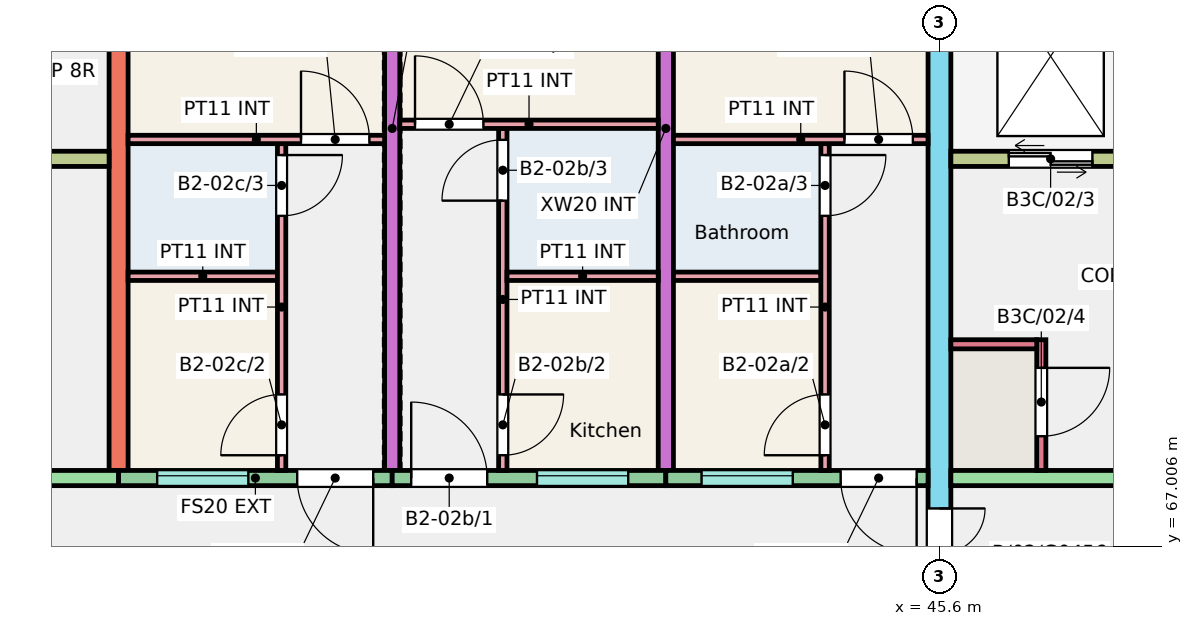
"""IFC4 building model, lengths in metres.
Left out: names, types, materials, properties, quantities, classifications, styles, units other than length and angle.
Written with IfcOpenShell. Run it as: python <this file> out.ifc"""

import sys

from ifc_helpers import new_model, si_unit, direction, frame, frame_2d, origin, place, context, subcontext, project, spatial, rectangle, extrude, element, fill, save


model = new_model("IFC4")
c1 = context("Model", 3, precision=1e-05, world=origin(), true_north=direction((0.0, 1.0)))
c2 = subcontext(c1, "Body", "Model", "MODEL_VIEW")
j1 = project(units=[si_unit("LENGTHUNIT", "METRE"), si_unit("PLANEANGLEUNIT", "RADIAN")], contexts=[c1])
p1 = place(None, origin())
s1 = spatial("IfcSite", under=j1, at=p1, CompositionType="ELEMENT")
p2 = place(p1, origin())
s2 = spatial("IfcBuilding", under=s1, at=p2, CompositionType="ELEMENT")
p3 = place(p2, frame((0.0, 0.0, 6.0)))
s3 = spatial("IfcBuildingStorey", under=s2, at=p3, CompositionType="ELEMENT", Elevation=6.0)
p4 = place(p3, frame((34.8, 68.0, 0.0), z_axis=(0.0, 0.0, 1.0), x_axis=(0.0, 1.0, 0.0)))
e1 = element("IfcWall", 1, at=p4, inside=s3, PredefinedType="SHEAR", context=c2, shape_type="SweptSolid", body=[
    extrude(rectangle(XDim=9.0, YDim=0.25, at=frame_2d((4.5, 0.0))), origin(), (0.0, 0.0, 1.0), 3.0),
])
for number, where, z_axis, x_axis in (
    (2, (38.4, 68.0, 0.0), (0.0, 0.0, 1.0), (0.0, 1.0, 0.0)),
    (3, (42.0, 68.0, 0.0), (0.0, 0.0, 1.0), (0.0, 1.0, 0.0)),
):
    element("IfcWall", number, at=place(p3, frame(where, z_axis=z_axis, x_axis=x_axis)), inside=s3, PredefinedType="SHEAR", context=c2, shape_type="SweptSolid", body=[
        extrude(rectangle(XDim=9.0, YDim=0.2, at=frame_2d((4.5, 0.0))), origin(), (0.0, 0.0, 1.0), 3.0),
    ])
p5 = place(p3, frame((45.6, 66.0, 0.0), z_axis=(0.0, 0.0, 1.0), x_axis=(0.0, 1.0, 0.0)))
e4 = element("IfcWall", 4, at=p5, inside=s3, PredefinedType="SHEAR", context=c2, shape_type="SweptSolid", body=[
    extrude(rectangle(XDim=11.0, YDim=0.3, at=frame_2d((5.5, 0.0))), origin(), (0.0, 0.0, 1.0), 3.0),
])
p6 = place(p5, frame((0.3, 0.0, 0.0)))
e5 = element("IfcOpeningElement", 5, at=p6, cuts=e4, PredefinedType="OPENING", context=c2, shape_type="SweptSolid", body=[
    extrude(rectangle(XDim=1.2, YDim=2.1, at=frame_2d((0.6, 1.05))), frame((0.0, 0.16, 0.0), z_axis=(0.0, -1.0, 0.0), x_axis=(1.0, 0.0, 0.0)), (0.0, 0.0, 1.0), 0.32),
])
p7 = place(p3, frame((28.95, 67.9, 0.0), z_axis=(0.0, 0.0, 1.0), x_axis=(1.0, 0.0, 0.0)))
e6 = element("IfcWall", 6, at=p7, inside=s3, PredefinedType="SHEAR", context=c2, shape_type="SweptSolid", body=[
    extrude(rectangle(XDim=5.85, YDim=0.2, at=frame_2d((2.925, 0.0))), origin(), (0.0, 0.0, 1.0), 3.0),
])
p8 = place(p7, frame((2.312, 0.0, 0.0)))
e7 = element("IfcOpeningElement", 7, at=p8, cuts=e6, PredefinedType="OPENING", context=c2, shape_type="SweptSolid", body=[
    extrude(rectangle(XDim=1.1, YDim=2.1, at=frame_2d((0.55, 1.05))), frame((0.0, 0.11, 0.0), z_axis=(0.0, -1.0, 0.0), x_axis=(1.0, 0.0, 0.0)), (0.0, 0.0, 1.0), 0.22),
])
p9 = place(p3, frame((28.95, 72.1, 0.0), z_axis=(0.0, 0.0, 1.0), x_axis=(1.0, 0.0, 0.0)))
e8 = element("IfcWall", 8, at=p9, inside=s3, PredefinedType="SHEAR", context=c2, shape_type="SweptSolid", body=[
    extrude(rectangle(XDim=5.725, YDim=0.2, at=frame_2d((2.863, 0.0))), origin(), (0.0, 0.0, 1.0), 3.0),
])
p10 = place(p9, frame((3.775, 0.0, 0.0)))
e9 = element("IfcOpeningElement", 9, at=p10, cuts=e8, PredefinedType="OPENING", context=c2, shape_type="SweptSolid", body=[
    extrude(rectangle(XDim=1.0, YDim=2.1, at=frame_2d((0.5, 1.05))), frame((0.0, 0.11, 0.0), z_axis=(0.0, -1.0, 0.0), x_axis=(1.0, 0.0, 0.0)), (0.0, 0.0, 1.0), 0.22),
])
p11 = place(p9, frame((0.762, 0.0, 0.0)))
e10 = element("IfcOpeningElement", 10, at=p11, cuts=e8, PredefinedType="OPENING", context=c2, shape_type="SweptSolid", body=[
    extrude(rectangle(XDim=1.1, YDim=2.1, at=frame_2d((0.55, 1.05))), frame((0.0, 0.11, 0.0), z_axis=(0.0, -1.0, 0.0), x_axis=(1.0, 0.0, 0.0)), (0.0, 0.0, 1.0), 0.22),
])
p12 = place(p3, frame((34.8, 67.9, 0.0), z_axis=(0.0, 0.0, 1.0), x_axis=(1.0, 0.0, 0.0)))
e11 = element("IfcWall", 11, at=p12, inside=s3, PredefinedType="SOLIDWALL", context=c2, shape_type="SweptSolid", body=[
    extrude(rectangle(XDim=3.6, YDim=0.2, at=frame_2d((1.8, 0.0))), origin(), (0.0, 0.0, 1.0), 3.0),
])
p13 = place(p12, frame((0.508, 0.0, 1.1)))
e12 = element("IfcOpeningElement", 12, at=p13, cuts=e11, PredefinedType="OPENING", context=c2, shape_type="SweptSolid", body=[
    extrude(rectangle(XDim=1.2, YDim=1.3, at=frame_2d((0.6, 0.65))), frame((0.0, 0.11, 0.0), z_axis=(0.0, -1.0, 0.0), x_axis=(1.0, 0.0, 0.0)), (0.0, 0.0, 1.0), 0.22),
])
p14 = place(p12, frame((2.35, 0.0, 0.0)))
e13 = element("IfcOpeningElement", 13, at=p14, cuts=e11, PredefinedType="OPENING", context=c2, shape_type="SweptSolid", body=[
    extrude(rectangle(XDim=1.0, YDim=2.1, at=frame_2d((0.5, 1.05))), frame((0.0, 0.11, 0.0), z_axis=(0.0, -1.0, 0.0), x_axis=(1.0, 0.0, 0.0)), (0.0, 0.0, 1.0), 0.22),
])
p15 = place(p3, frame((38.4, 67.9, 0.0), z_axis=(0.0, 0.0, 1.0), x_axis=(1.0, 0.0, 0.0)))
e14 = element("IfcWall", 14, at=p15, inside=s3, PredefinedType="SOLIDWALL", context=c2, shape_type="SweptSolid", body=[
    extrude(rectangle(XDim=3.6, YDim=0.2, at=frame_2d((1.8, 0.0))), origin(), (0.0, 0.0, 1.0), 3.0),
])
p16 = place(p15, frame((1.905, 0.0, 1.1)))
e15 = element("IfcOpeningElement", 15, at=p16, cuts=e14, PredefinedType="OPENING", context=c2, shape_type="SweptSolid", body=[
    extrude(rectangle(XDim=1.2, YDim=1.3, at=frame_2d((0.6, 0.65))), frame((0.0, 0.11, 0.0), z_axis=(0.0, -1.0, 0.0), x_axis=(1.0, 0.0, 0.0)), (0.0, 0.0, 1.0), 0.22),
])
p17 = place(p15, frame((0.25, 0.0, 0.0)))
e16 = element("IfcOpeningElement", 16, at=p17, cuts=e14, PredefinedType="OPENING", context=c2, shape_type="SweptSolid", body=[
    extrude(rectangle(XDim=1.0, YDim=2.1, at=frame_2d((0.5, 1.05))), frame((0.0, 0.11, 0.0), z_axis=(0.0, -1.0, 0.0), x_axis=(1.0, 0.0, 0.0)), (0.0, 0.0, 1.0), 0.22),
])
p18 = place(p3, frame((42.0, 67.9, 0.0), z_axis=(0.0, 0.0, 1.0), x_axis=(1.0, 0.0, 0.0)))
e17 = element("IfcWall", 17, at=p18, inside=s3, PredefinedType="SOLIDWALL", context=c2, shape_type="SweptSolid", body=[
    extrude(rectangle(XDim=3.45, YDim=0.2, at=frame_2d((1.725, 0.0))), origin(), (0.0, 0.0, 1.0), 3.0),
])
p19 = place(p18, frame((0.47, 0.0, 1.1)))
e18 = element("IfcOpeningElement", 18, at=p19, cuts=e17, PredefinedType="OPENING", context=c2, shape_type="SweptSolid", body=[
    extrude(rectangle(XDim=1.2, YDim=1.3, at=frame_2d((0.6, 0.65))), frame((0.0, 0.11, 0.0), z_axis=(0.0, -1.0, 0.0), x_axis=(1.0, 0.0, 0.0)), (0.0, 0.0, 1.0), 0.22),
])
p20 = place(p18, frame((2.3, 0.0, 0.0)))
e19 = element("IfcOpeningElement", 19, at=p20, cuts=e17, PredefinedType="OPENING", context=c2, shape_type="SweptSolid", body=[
    extrude(rectangle(XDim=1.0, YDim=2.1, at=frame_2d((0.5, 1.05))), frame((0.0, 0.11, 0.0), z_axis=(0.0, -1.0, 0.0), x_axis=(1.0, 0.0, 0.0)), (0.0, 0.0, 1.0), 0.22),
])
p21 = place(p3, frame((45.75, 67.9, 0.0), z_axis=(0.0, 0.0, 1.0), x_axis=(1.0, 0.0, 0.0)))
e20 = element("IfcWall", 20, at=p21, inside=s3, PredefinedType="SHEAR", context=c2, shape_type="SweptSolid", body=[
    extrude(rectangle(XDim=5.85, YDim=0.2, at=frame_2d((2.925, 0.0))), origin(), (0.0, 0.0, 1.0), 3.0),
])
p22 = place(p21, frame((2.312, 0.0, 0.0)))
e21 = element("IfcOpeningElement", 21, at=p22, cuts=e20, PredefinedType="OPENING", context=c2, shape_type="SweptSolid", body=[
    extrude(rectangle(XDim=1.1, YDim=2.1, at=frame_2d((0.55, 1.05))), frame((0.0, 0.11, 0.0), z_axis=(0.0, -1.0, 0.0), x_axis=(1.0, 0.0, 0.0)), (0.0, 0.0, 1.0), 0.22),
])
p23 = place(p3, frame((45.75, 72.1, 0.0), z_axis=(0.0, 0.0, 1.0), x_axis=(1.0, 0.0, 0.0)))
e22 = element("IfcWall", 22, at=p23, inside=s3, PredefinedType="SHEAR", context=c2, shape_type="SweptSolid", body=[
    extrude(rectangle(XDim=5.725, YDim=0.2, at=frame_2d((2.863, 0.0))), origin(), (0.0, 0.0, 1.0), 3.0),
])
p24 = place(p23, frame((3.775, 0.0, 0.0)))
e23 = element("IfcOpeningElement", 23, at=p24, cuts=e22, PredefinedType="OPENING", context=c2, shape_type="SweptSolid", body=[
    extrude(rectangle(XDim=1.0, YDim=2.1, at=frame_2d((0.5, 1.05))), frame((0.0, 0.11, 0.0), z_axis=(0.0, -1.0, 0.0), x_axis=(1.0, 0.0, 0.0)), (0.0, 0.0, 1.0), 0.22),
])
p25 = place(p23, frame((0.762, 0.0, 0.0)))
e24 = element("IfcOpeningElement", 24, at=p25, cuts=e22, PredefinedType="OPENING", context=c2, shape_type="SweptSolid", body=[
    extrude(rectangle(XDim=1.1, YDim=2.1, at=frame_2d((0.55, 1.05))), frame((0.0, 0.11, 0.0), z_axis=(0.0, -1.0, 0.0), x_axis=(1.0, 0.0, 0.0)), (0.0, 0.0, 1.0), 0.22),
])
p26 = place(p3, frame((46.94, 68.0, 0.0), z_axis=(0.0, 0.0, 1.0), x_axis=(0.0, 1.0, 0.0)))
e25 = element("IfcWall", 25, at=p26, inside=s3, PredefinedType="SHEAR", context=c2, shape_type="SweptSolid", body=[
    extrude(rectangle(XDim=1.72, YDim=0.12, at=frame_2d((0.86, 0.0))), origin(), (0.0, 0.0, 1.0), 3.0),
])
p27 = place(p26, frame((0.45, 0.0, 0.0)))
e26 = element("IfcOpeningElement", 26, at=p27, cuts=e25, PredefinedType="OPENING", context=c2, shape_type="SweptSolid", body=[
    extrude(rectangle(XDim=0.9, YDim=2.1, at=frame_2d((0.45, 1.05))), frame((0.0, 0.07, 0.0), z_axis=(0.0, -1.0, 0.0), x_axis=(1.0, 0.0, 0.0)), (0.0, 0.0, 1.0), 0.14),
])
p28 = place(p3, frame((45.75, 69.66, 0.0), z_axis=(0.0, 0.0, 1.0), x_axis=(1.0, 0.0, 0.0)))
e27 = element("IfcWall", 27, at=p28, inside=s3, PredefinedType="SHEAR", context=c2, shape_type="SweptSolid", body=[
    extrude(rectangle(XDim=1.13, YDim=0.12, at=frame_2d((0.565, 0.0))), origin(), (0.0, 0.0, 1.0), 3.0),
])
p29 = place(p3, frame((42.1, 70.555, 0.0), z_axis=(0.0, 0.0, 1.0), x_axis=(1.0, 0.0, 0.0)))
e28 = element("IfcWall", 28, at=p29, inside=s3, PredefinedType="PARTITIONING", context=c2, shape_type="SweptSolid", body=[
    extrude(rectangle(XDim=1.94, YDim=0.11, at=frame_2d((0.97, 0.0))), origin(), (0.0, 0.0, 1.0), 2.8),
])
p30 = place(p3, frame((44.095, 68.0, 0.0), z_axis=(0.0, 0.0, 1.0), x_axis=(0.0, 1.0, 0.0)))
e29 = element("IfcWall", 29, at=p30, inside=s3, PredefinedType="PARTITIONING", context=c2, shape_type="SweptSolid", body=[
    extrude(rectangle(XDim=4.3, YDim=0.11, at=frame_2d((2.15, 0.0))), origin(), (0.0, 0.0, 1.0), 2.8),
])
p31 = place(p30, frame((0.2, 0.0, 0.0)))
e30 = element("IfcOpeningElement", 30, at=p31, cuts=e29, PredefinedType="OPENING", context=c2, shape_type="SweptSolid", body=[
    extrude(rectangle(XDim=0.8, YDim=2.1, at=frame_2d((0.4, 1.05))), frame((0.0, 0.065, 0.0), z_axis=(0.0, -1.0, 0.0), x_axis=(1.0, 0.0, 0.0)), (0.0, 0.0, 1.0), 0.13),
])
p32 = place(p30, frame((3.35, 0.0, 0.0)))
e31 = element("IfcOpeningElement", 31, at=p32, cuts=e29, PredefinedType="OPENING", context=c2, shape_type="SweptSolid", body=[
    extrude(rectangle(XDim=0.8, YDim=2.1, at=frame_2d((0.4, 1.05))), frame((0.0, 0.065, 0.0), z_axis=(0.0, -1.0, 0.0), x_axis=(1.0, 0.0, 0.0)), (0.0, 0.0, 1.0), 0.13),
])
p33 = place(p3, frame((42.1, 72.355, 0.0), z_axis=(0.0, 0.0, 1.0), x_axis=(1.0, 0.0, 0.0)))
e32 = element("IfcWall", 32, at=p33, inside=s3, PredefinedType="PARTITIONING", context=c2, shape_type="SweptSolid", body=[
    extrude(rectangle(XDim=3.35, YDim=0.11, at=frame_2d((1.675, 0.0))), origin(), (0.0, 0.0, 1.0), 2.8),
])
p34 = place(p33, frame((2.25, 0.0, 0.0)))
e33 = element("IfcOpeningElement", 33, at=p34, cuts=e32, PredefinedType="OPENING", context=c2, shape_type="SweptSolid", body=[
    extrude(rectangle(XDim=0.9, YDim=2.1, at=frame_2d((0.45, 1.05))), frame((0.0, 0.065, 0.0), z_axis=(0.0, -1.0, 0.0), x_axis=(1.0, 0.0, 0.0)), (0.0, 0.0, 1.0), 0.13),
])
p35 = place(p3, frame((39.855, 68.0, 0.0), z_axis=(0.0, 0.0, 1.0), x_axis=(0.0, 1.0, 0.0)))
e34 = element("IfcWall", 34, at=p35, inside=s3, PredefinedType="PARTITIONING", context=c2, shape_type="SweptSolid", body=[
    extrude(rectangle(XDim=4.5, YDim=0.11, at=frame_2d((2.25, 0.0))), origin(), (0.0, 0.0, 1.0), 2.8),
])
p36 = place(p35, frame((0.2, 0.0, 0.0)))
e35 = element("IfcOpeningElement", 35, at=p36, cuts=e34, PredefinedType="OPENING", context=c2, shape_type="SweptSolid", body=[
    extrude(rectangle(XDim=0.8, YDim=2.1, at=frame_2d((0.4, 1.05))), frame((0.0, 0.065, 0.0), z_axis=(0.0, -1.0, 0.0), x_axis=(1.0, 0.0, 0.0)), (0.0, 0.0, 1.0), 0.13),
])
p37 = place(p35, frame((3.55, 0.0, 0.0)))
e36 = element("IfcOpeningElement", 36, at=p37, cuts=e34, PredefinedType="OPENING", context=c2, shape_type="SweptSolid", body=[
    extrude(rectangle(XDim=0.8, YDim=2.1, at=frame_2d((0.4, 1.05))), frame((0.0, 0.065, 0.0), z_axis=(0.0, -1.0, 0.0), x_axis=(1.0, 0.0, 0.0)), (0.0, 0.0, 1.0), 0.13),
])
p38 = place(p3, frame((39.91, 70.555, 0.0), z_axis=(0.0, 0.0, 1.0), x_axis=(1.0, 0.0, 0.0)))
e37 = element("IfcWall", 37, at=p38, inside=s3, PredefinedType="PARTITIONING", context=c2, shape_type="SweptSolid", body=[
    extrude(rectangle(XDim=1.99, YDim=0.11, at=frame_2d((0.995, 0.0))), origin(), (0.0, 0.0, 1.0), 2.8),
])
p39 = place(p3, frame((38.5, 72.555, 0.0), z_axis=(0.0, 0.0, 1.0), x_axis=(1.0, 0.0, 0.0)))
e38 = element("IfcWall", 38, at=p39, inside=s3, PredefinedType="PARTITIONING", context=c2, shape_type="SweptSolid", body=[
    extrude(rectangle(XDim=3.4, YDim=0.11, at=frame_2d((1.7, 0.0))), origin(), (0.0, 0.0, 1.0), 2.8),
])
p40 = place(p39, frame((0.2, 0.0, 0.0)))
e39 = element("IfcOpeningElement", 39, at=p40, cuts=e38, PredefinedType="OPENING", context=c2, shape_type="SweptSolid", body=[
    extrude(rectangle(XDim=0.9, YDim=2.1, at=frame_2d((0.45, 1.05))), frame((0.0, 0.065, 0.0), z_axis=(0.0, -1.0, 0.0), x_axis=(1.0, 0.0, 0.0)), (0.0, 0.0, 1.0), 0.13),
])
p41 = place(p3, frame((34.925, 70.555, 0.0), z_axis=(0.0, 0.0, 1.0), x_axis=(1.0, 0.0, 0.0)))
e40 = element("IfcWall", 40, at=p41, inside=s3, PredefinedType="PARTITIONING", context=c2, shape_type="SweptSolid", body=[
    extrude(rectangle(XDim=1.965, YDim=0.11, at=frame_2d((0.982, 0.0))), origin(), (0.0, 0.0, 1.0), 2.8),
])
p42 = place(p3, frame((36.945, 68.0, 0.0), z_axis=(0.0, 0.0, 1.0), x_axis=(0.0, 1.0, 0.0)))
e41 = element("IfcWall", 41, at=p42, inside=s3, PredefinedType="PARTITIONING", context=c2, shape_type="SweptSolid", body=[
    extrude(rectangle(XDim=4.3, YDim=0.11, at=frame_2d((2.15, 0.0))), origin(), (0.0, 0.0, 1.0), 2.8),
])
p43 = place(p42, frame((0.2, 0.0, 0.0)))
e42 = element("IfcOpeningElement", 42, at=p43, cuts=e41, PredefinedType="OPENING", context=c2, shape_type="SweptSolid", body=[
    extrude(rectangle(XDim=0.8, YDim=2.1, at=frame_2d((0.4, 1.05))), frame((0.0, 0.065, 0.0), z_axis=(0.0, -1.0, 0.0), x_axis=(1.0, 0.0, 0.0)), (0.0, 0.0, 1.0), 0.13),
])
p44 = place(p42, frame((3.35, 0.0, 0.0)))
e43 = element("IfcOpeningElement", 43, at=p44, cuts=e41, PredefinedType="OPENING", context=c2, shape_type="SweptSolid", body=[
    extrude(rectangle(XDim=0.8, YDim=2.1, at=frame_2d((0.4, 1.05))), frame((0.0, 0.065, 0.0), z_axis=(0.0, -1.0, 0.0), x_axis=(1.0, 0.0, 0.0)), (0.0, 0.0, 1.0), 0.13),
])
p45 = place(p3, frame((34.925, 72.355, 0.0), z_axis=(0.0, 0.0, 1.0), x_axis=(1.0, 0.0, 0.0)))
e44 = element("IfcWall", 44, at=p45, inside=s3, PredefinedType="PARTITIONING", context=c2, shape_type="SweptSolid", body=[
    extrude(rectangle(XDim=3.375, YDim=0.11, at=frame_2d((1.688, 0.0))), origin(), (0.0, 0.0, 1.0), 2.8),
])
p46 = place(p45, frame((2.275, 0.0, 0.0)))
e45 = element("IfcOpeningElement", 45, at=p46, cuts=e44, PredefinedType="OPENING", context=c2, shape_type="SweptSolid", body=[
    extrude(rectangle(XDim=0.9, YDim=2.1, at=frame_2d((0.45, 1.05))), frame((0.0, 0.065, 0.0), z_axis=(0.0, -1.0, 0.0), x_axis=(1.0, 0.0, 0.0)), (0.0, 0.0, 1.0), 0.13),
])
p47 = place(p19, origin())
e46 = element("IfcWindow", 46, at=p47, inside=s3, PartitioningType="SINGLE_PANEL", PredefinedType="WINDOW", context=c2, shape_type="SweptSolid", body=[
    extrude(rectangle(XDim=1.2, YDim=1.3, at=frame_2d((0.6, 0.65))), frame((0.0, 0.06, 0.0), z_axis=(0.0, -1.0, 0.0), x_axis=(1.0, 0.0, 0.0)), (0.0, 0.0, 1.0), 0.06),
])
fill(e18, e46)
p48 = place(p16, origin())
e47 = element("IfcWindow", 47, at=p48, inside=s3, PartitioningType="SINGLE_PANEL", PredefinedType="WINDOW", context=c2, shape_type="SweptSolid", body=[
    extrude(rectangle(XDim=1.2, YDim=1.3, at=frame_2d((0.6, 0.65))), frame((0.0, 0.06, 0.0), z_axis=(0.0, -1.0, 0.0), x_axis=(1.0, 0.0, 0.0)), (0.0, 0.0, 1.0), 0.06),
])
fill(e15, e47)
p49 = place(p13, origin())
e48 = element("IfcWindow", 48, at=p49, inside=s3, PartitioningType="SINGLE_PANEL", PredefinedType="WINDOW", context=c2, shape_type="SweptSolid", body=[
    extrude(rectangle(XDim=1.2, YDim=1.3, at=frame_2d((0.6, 0.65))), frame((0.0, 0.06, 0.0), z_axis=(0.0, -1.0, 0.0), x_axis=(1.0, 0.0, 0.0)), (0.0, 0.0, 1.0), 0.06),
])
fill(e12, e48)
p50 = place(p20, origin())
e49 = element("IfcDoor", 49, at=p50, inside=s3, OperationType="SINGLE_SWING_RIGHT", PredefinedType="DOOR", context=c2, shape_type="SweptSolid", body=[
    extrude(rectangle(XDim=1.0, YDim=2.1, at=frame_2d((0.5, 1.05))), frame((0.0, 0.025, 0.0), z_axis=(0.0, -1.0, 0.0), x_axis=(1.0, 0.0, 0.0)), (0.0, 0.0, 1.0), 0.05),
])
fill(e19, e49)
p51 = place(p31, origin())
e50 = element("IfcDoor", 50, at=p51, inside=s3, OperationType="SINGLE_SWING_LEFT", PredefinedType="DOOR", context=c2, shape_type="SweptSolid", body=[
    extrude(rectangle(XDim=0.8, YDim=2.1, at=frame_2d((0.4, 1.05))), frame((0.0, 0.025, 0.0), z_axis=(0.0, -1.0, 0.0), x_axis=(1.0, 0.0, 0.0)), (0.0, 0.0, 1.0), 0.05),
])
fill(e30, e50)
p52 = place(p32, origin())
e51 = element("IfcDoor", 51, at=p52, inside=s3, OperationType="SINGLE_SWING_RIGHT", PredefinedType="DOOR", context=c2, shape_type="SweptSolid", body=[
    extrude(rectangle(XDim=0.8, YDim=2.1, at=frame_2d((0.4, 1.05))), frame((0.0, 0.025, 0.0), z_axis=(0.0, -1.0, 0.0), x_axis=(1.0, 0.0, 0.0)), (0.0, 0.0, 1.0), 0.05),
])
fill(e31, e51)
p53 = place(p34, origin())
e52 = element("IfcDoor", 52, at=p53, inside=s3, OperationType="SINGLE_SWING_LEFT", PredefinedType="DOOR", context=c2, shape_type="SweptSolid", body=[
    extrude(rectangle(XDim=0.9, YDim=2.1, at=frame_2d((0.45, 1.05))), frame((0.0, 0.025, 0.0), z_axis=(0.0, -1.0, 0.0), x_axis=(1.0, 0.0, 0.0)), (0.0, 0.0, 1.0), 0.05),
])
fill(e33, e52)
p54 = place(p17, origin())
e53 = element("IfcDoor", 53, at=p54, inside=s3, OperationType="SINGLE_SWING_LEFT", PredefinedType="DOOR", context=c2, shape_type="SweptSolid", body=[
    extrude(rectangle(XDim=1.0, YDim=2.1, at=frame_2d((0.5, 1.05))), frame((0.0, 0.025, 0.0), z_axis=(0.0, -1.0, 0.0), x_axis=(1.0, 0.0, 0.0)), (0.0, 0.0, 1.0), 0.05),
])
fill(e16, e53)
p55 = place(p36, origin())
e54 = element("IfcDoor", 54, at=p55, inside=s3, OperationType="SINGLE_SWING_RIGHT", PredefinedType="DOOR", context=c2, shape_type="SweptSolid", body=[
    extrude(rectangle(XDim=0.8, YDim=2.1, at=frame_2d((0.4, 1.05))), frame((0.0, 0.025, 0.0), z_axis=(0.0, -1.0, 0.0), x_axis=(1.0, 0.0, 0.0)), (0.0, 0.0, 1.0), 0.05),
])
fill(e35, e54)
p56 = place(p37, origin())
e55 = element("IfcDoor", 55, at=p56, inside=s3, OperationType="SINGLE_SWING_LEFT", PredefinedType="DOOR", context=c2, shape_type="SweptSolid", body=[
    extrude(rectangle(XDim=0.8, YDim=2.1, at=frame_2d((0.4, 1.05))), frame((0.0, 0.025, 0.0), z_axis=(0.0, -1.0, 0.0), x_axis=(1.0, 0.0, 0.0)), (0.0, 0.0, 1.0), 0.05),
])
fill(e36, e55)
p57 = place(p40, origin())
e56 = element("IfcDoor", 56, at=p57, inside=s3, OperationType="SINGLE_SWING_LEFT", PredefinedType="DOOR", context=c2, shape_type="SweptSolid", body=[
    extrude(rectangle(XDim=0.9, YDim=2.1, at=frame_2d((0.45, 1.05))), frame((0.0, 0.025, 0.0), z_axis=(0.0, -1.0, 0.0), x_axis=(1.0, 0.0, 0.0)), (0.0, 0.0, 1.0), 0.05),
])
fill(e39, e56)
p58 = place(p14, origin())
e57 = element("IfcDoor", 57, at=p58, inside=s3, OperationType="SINGLE_SWING_RIGHT", PredefinedType="DOOR", context=c2, shape_type="SweptSolid", body=[
    extrude(rectangle(XDim=1.0, YDim=2.1, at=frame_2d((0.5, 1.05))), frame((0.0, 0.025, 0.0), z_axis=(0.0, -1.0, 0.0), x_axis=(1.0, 0.0, 0.0)), (0.0, 0.0, 1.0), 0.05),
])
fill(e13, e57)
p59 = place(p43, origin())
e58 = element("IfcDoor", 58, at=p59, inside=s3, OperationType="SINGLE_SWING_LEFT", PredefinedType="DOOR", context=c2, shape_type="SweptSolid", body=[
    extrude(rectangle(XDim=0.8, YDim=2.1, at=frame_2d((0.4, 1.05))), frame((0.0, 0.025, 0.0), z_axis=(0.0, -1.0, 0.0), x_axis=(1.0, 0.0, 0.0)), (0.0, 0.0, 1.0), 0.05),
])
fill(e42, e58)
p60 = place(p44, origin())
e59 = element("IfcDoor", 59, at=p60, inside=s3, OperationType="SINGLE_SWING_RIGHT", PredefinedType="DOOR", context=c2, shape_type="SweptSolid", body=[
    extrude(rectangle(XDim=0.8, YDim=2.1, at=frame_2d((0.4, 1.05))), frame((0.0, 0.025, 0.0), z_axis=(0.0, -1.0, 0.0), x_axis=(1.0, 0.0, 0.0)), (0.0, 0.0, 1.0), 0.05),
])
fill(e43, e59)
p61 = place(p46, origin())
e60 = element("IfcDoor", 60, at=p61, inside=s3, OperationType="SINGLE_SWING_LEFT", PredefinedType="DOOR", context=c2, shape_type="SweptSolid", body=[
    extrude(rectangle(XDim=0.9, YDim=2.1, at=frame_2d((0.45, 1.05))), frame((0.0, 0.025, 0.0), z_axis=(0.0, -1.0, 0.0), x_axis=(1.0, 0.0, 0.0)), (0.0, 0.0, 1.0), 0.05),
])
fill(e45, e60)
p62 = place(p25, origin())
e61 = element("IfcDoor", 61, at=p62, inside=s3, OperationType="DOUBLE_DOOR_SLIDING", PredefinedType="DOOR", context=c2, shape_type="SweptSolid", body=[
    extrude(rectangle(XDim=1.1, YDim=2.1, at=frame_2d((0.55, 1.05))), frame((0.0, 0.025, 0.0), z_axis=(0.0, -1.0, 0.0), x_axis=(1.0, 0.0, 0.0)), (0.0, 0.0, 1.0), 0.05),
])
fill(e24, e61)
p63 = place(p27, origin())
e62 = element("IfcDoor", 62, at=p63, inside=s3, OperationType="SINGLE_SWING_RIGHT", PredefinedType="DOOR", context=c2, shape_type="SweptSolid", body=[
    extrude(rectangle(XDim=0.9, YDim=2.1, at=frame_2d((0.45, 1.05))), frame((0.0, 0.025, 0.0), z_axis=(0.0, -1.0, 0.0), x_axis=(1.0, 0.0, 0.0)), (0.0, 0.0, 1.0), 0.05),
])
fill(e26, e62)
p64 = place(p6, origin())
e63 = element("IfcDoor", 63, at=p64, inside=s3, OperationType="DOUBLE_DOOR_SINGLE_SWING", PredefinedType="DOOR", context=c2, shape_type="SweptSolid", body=[
    extrude(rectangle(XDim=1.2, YDim=2.1, at=frame_2d((0.6, 1.05))), frame((0.0, 0.025, 0.0), z_axis=(0.0, -1.0, 0.0), x_axis=(1.0, 0.0, 0.0)), (0.0, 0.0, 1.0), 0.05),
])
fill(e5, e63)
save(model, sys.argv[1])
